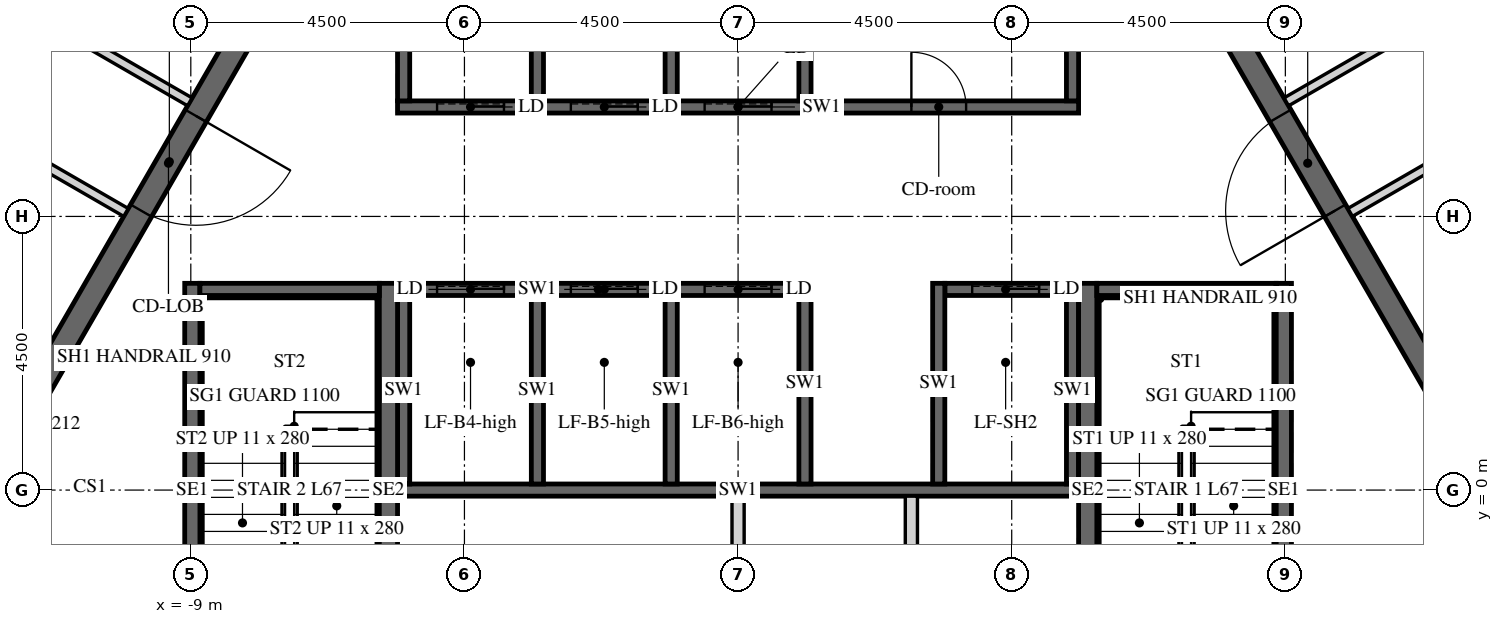
"""IFC4 building model, lengths in metres.
Left out: names, types, materials, properties, quantities, classifications, styles, units other than length and angle.
Written with IfcOpenShell. Run it as: python <this file> out.ifc"""

import sys

from ifc_helpers import new_model, si_unit, direction, frame, frame_2d, origin, place, context, subcontext, project, spatial, polyline, rectangle, outline, extrude, element, fill, save


model = new_model("IFC4")
c1 = context("Model", 3, precision=1e-05, world=origin(), true_north=direction((0.0, 1.0)))
c2 = subcontext(c1, "Body", "Model", "MODEL_VIEW")
j1 = project(units=[si_unit("LENGTHUNIT", "METRE"), si_unit("PLANEANGLEUNIT", "RADIAN")], contexts=[c1])
p1 = place(None, origin())
s1 = spatial("IfcSite", under=j1, at=p1, CompositionType="ELEMENT")
p2 = place(p1, origin())
s2 = spatial("IfcBuilding", under=s1, at=p2, CompositionType="ELEMENT")
p3 = place(p2, frame((0.0, 0.0, 279.6)))
s3 = spatial("IfcBuildingStorey", under=s2, at=p3, CompositionType="ELEMENT", Elevation=279.6)
p4 = place(p3, frame((-6.235, 10.8, -0.15), z_axis=(0.0, 0.0, 1.0), x_axis=(-0.499996419489, -0.866027470984, 0.0)))
e1 = element("IfcWall", 1, at=p4, inside=s3, PredefinedType="SHEAR", context=c2, shape_type="SweptSolid", body=[
    extrude(outline(polyline([(-0.115, -0.2), (12.586, -0.2), (12.355, 0.2), (0.115, 0.2), (-0.115, -0.2)])), origin(), (0.0, 0.0, 1.0), 3.9),
])
p5 = place(p4, frame((5.364, 0.0, 0.15)))
e2 = element("IfcOpeningElement", 2, at=p5, cuts=e1, PredefinedType="OPENING", context=c2, shape_type="SweptSolid", body=[
    extrude(rectangle(XDim=1.8, YDim=2.4, at=frame_2d((0.9, 1.2))), frame((0.0, 0.21, 0.0), z_axis=(0.0, -1.0, 0.0), x_axis=(1.0, 0.0, 0.0)), (0.0, 0.0, 1.0), 0.42),
])
p6 = place(p3, frame((-12.471, 0.0, -0.15), z_axis=(0.0, 0.0, 1.0), x_axis=(0.499996419489, -0.866027470984, 0.0)))
e3 = element("IfcWall", 3, at=p6, inside=s3, PredefinedType="SHEAR", context=c2, shape_type="SweptSolid", body=[
    extrude(outline(polyline([(-0.115, -0.2), (12.586, -0.2), (12.355, 0.2), (0.115, 0.2), (-0.115, -0.2)])), origin(), (0.0, 0.0, 1.0), 3.9),
])
p7 = place(p6, frame((5.306, 0.0, 0.15)))
e4 = element("IfcOpeningElement", 4, at=p7, cuts=e3, PredefinedType="OPENING", context=c2, shape_type="SweptSolid", body=[
    extrude(rectangle(XDim=1.8, YDim=2.4, at=frame_2d((0.9, 1.2))), frame((0.0, 0.21, 0.0), z_axis=(0.0, -1.0, 0.0), x_axis=(1.0, 0.0, 0.0)), (0.0, 0.0, 1.0), 0.42),
])
p8 = place(p3, frame((6.235, -10.8, -0.15), z_axis=(0.0, 0.0, 1.0), x_axis=(0.499996419489, 0.866027470984, 0.0)))
e5 = element("IfcWall", 5, at=p8, inside=s3, PredefinedType="SHEAR", context=c2, shape_type="SweptSolid", body=[
    extrude(outline(polyline([(-0.115, -0.2), (12.586, -0.2), (12.355, 0.2), (0.115, 0.2), (-0.115, -0.2)])), origin(), (0.0, 0.0, 1.0), 3.9),
])
p9 = place(p8, frame((5.364, 0.0, 0.15)))
e6 = element("IfcOpeningElement", 6, at=p9, cuts=e5, PredefinedType="OPENING", context=c2, shape_type="SweptSolid", body=[
    extrude(rectangle(XDim=1.8, YDim=2.4, at=frame_2d((0.9, 1.2))), frame((0.0, 0.21, 0.0), z_axis=(0.0, -1.0, 0.0), x_axis=(1.0, 0.0, 0.0)), (0.0, 0.0, 1.0), 0.42),
])
p10 = place(p3, frame((12.471, 0.0, -0.15), z_axis=(0.0, 0.0, 1.0), x_axis=(-0.499996419489, 0.866027470984, 0.0)))
e7 = element("IfcWall", 7, at=p10, inside=s3, PredefinedType="SHEAR", context=c2, shape_type="SweptSolid", body=[
    extrude(outline(polyline([(-0.115, -0.2), (12.586, -0.2), (12.355, 0.2), (0.115, 0.2), (-0.115, -0.2)])), origin(), (0.0, 0.0, 1.0), 3.9),
])
p11 = place(p10, frame((5.306, 0.0, 0.15)))
e8 = element("IfcOpeningElement", 8, at=p11, cuts=e7, PredefinedType="OPENING", context=c2, shape_type="SweptSolid", body=[
    extrude(rectangle(XDim=1.8, YDim=2.4, at=frame_2d((0.9, 1.2))), frame((0.0, 0.21, 0.0), z_axis=(0.0, -1.0, 0.0), x_axis=(1.0, 0.0, 0.0)), (0.0, 0.0, 1.0), 0.42),
])
p12 = place(p3, frame((-5.6, 6.3, -0.25), z_axis=(0.0, 0.0, 1.0), x_axis=(1.0, 0.0, 0.0)))
e9 = element("IfcWall", 9, at=p12, inside=s3, PredefinedType="SHEAR", context=c2, shape_type="SweptSolid", body=[
    extrude(rectangle(XDim=11.2, YDim=0.2, at=frame_2d((5.6, 0.0))), origin(), (0.0, 0.0, 1.0), 3.9),
])
p13 = place(p12, frame((8.45, 0.0, 0.25)))
e10 = element("IfcOpeningElement", 10, at=p13, cuts=e9, PredefinedType="OPENING", context=c2, shape_type="SweptSolid", body=[
    extrude(rectangle(XDim=0.9, YDim=2.1, at=frame_2d((0.45, 1.05))), frame((0.0, 0.11, 0.0), z_axis=(0.0, -1.0, 0.0), x_axis=(1.0, 0.0, 0.0)), (0.0, 0.0, 1.0), 0.22),
])
p14 = place(p12, frame((0.65, 0.0, 0.25)))
e11 = element("IfcOpeningElement", 11, at=p14, cuts=e9, PredefinedType="OPENING", context=c2, shape_type="SweptSolid", body=[
    extrude(rectangle(XDim=1.1, YDim=2.1, at=frame_2d((0.55, 1.05))), frame((0.0, 0.11, 0.0), z_axis=(0.0, -1.0, 0.0), x_axis=(1.0, 0.0, 0.0)), (0.0, 0.0, 1.0), 0.22),
])
p15 = place(p12, frame((2.85, 0.0, 0.25)))
e12 = element("IfcOpeningElement", 12, at=p15, cuts=e9, PredefinedType="OPENING", context=c2, shape_type="SweptSolid", body=[
    extrude(rectangle(XDim=1.1, YDim=2.1, at=frame_2d((0.55, 1.05))), frame((0.0, 0.11, 0.0), z_axis=(0.0, -1.0, 0.0), x_axis=(1.0, 0.0, 0.0)), (0.0, 0.0, 1.0), 0.22),
])
p16 = place(p12, frame((5.05, 0.0, 0.25)))
e13 = element("IfcOpeningElement", 13, at=p16, cuts=e9, PredefinedType="OPENING", context=c2, shape_type="SweptSolid", body=[
    extrude(rectangle(XDim=1.1, YDim=2.1, at=frame_2d((0.55, 1.05))), frame((0.0, 0.11, 0.0), z_axis=(0.0, -1.0, 0.0), x_axis=(1.0, 0.0, 0.0)), (0.0, 0.0, 1.0), 0.22),
])
for number, where, z_axis, x_axis in (
    (14, (-5.5, 6.4, -0.25), (0.0, 0.0, 1.0), (0.0, 1.0, 0.0)),
    (15, (-3.3, 6.4, -0.25), (0.0, 0.0, 1.0), (0.0, 1.0, 0.0)),
    (16, (-1.1, 6.4, -0.25), (0.0, 0.0, 1.0), (0.0, 1.0, 0.0)),
    (17, (1.1, 6.4, -0.25), (0.0, 0.0, 1.0), (0.0, 1.0, 0.0)),
    (18, (5.5, 6.4, -0.25), (0.0, 0.0, 1.0), (0.0, 1.0, 0.0)),
):
    element("IfcWall", number, at=place(p3, frame(where, z_axis=z_axis, x_axis=x_axis)), inside=s3, PredefinedType="SHEAR", context=c2, shape_type="SweptSolid", body=[
        extrude(rectangle(XDim=2.9, YDim=0.2, at=frame_2d((1.45, 0.0))), origin(), (0.0, 0.0, 1.0), 3.9),
    ])
p17 = place(p3, frame((-5.6, 3.3, -0.25), z_axis=(0.0, 0.0, 1.0), x_axis=(1.0, 0.0, 0.0)))
e19 = element("IfcWall", 19, at=p17, inside=s3, PredefinedType="SHEAR", context=c2, shape_type="SweptSolid", body=[
    extrude(rectangle(XDim=6.6, YDim=0.2, at=frame_2d((3.3, 0.0))), origin(), (0.0, 0.0, 1.0), 3.9),
])
p18 = place(p17, frame((0.65, 0.0, 0.25)))
e20 = element("IfcOpeningElement", 20, at=p18, cuts=e19, PredefinedType="OPENING", context=c2, shape_type="SweptSolid", body=[
    extrude(rectangle(XDim=1.1, YDim=2.1, at=frame_2d((0.55, 1.05))), frame((0.0, 0.11, 0.0), z_axis=(0.0, -1.0, 0.0), x_axis=(1.0, 0.0, 0.0)), (0.0, 0.0, 1.0), 0.22),
])
p19 = place(p17, frame((2.85, 0.0, 0.25)))
e21 = element("IfcOpeningElement", 21, at=p19, cuts=e19, PredefinedType="OPENING", context=c2, shape_type="SweptSolid", body=[
    extrude(rectangle(XDim=1.1, YDim=2.1, at=frame_2d((0.55, 1.05))), frame((0.0, 0.11, 0.0), z_axis=(0.0, -1.0, 0.0), x_axis=(1.0, 0.0, 0.0)), (0.0, 0.0, 1.0), 0.22),
])
p20 = place(p17, frame((5.05, 0.0, 0.25)))
e22 = element("IfcOpeningElement", 22, at=p20, cuts=e19, PredefinedType="OPENING", context=c2, shape_type="SweptSolid", body=[
    extrude(rectangle(XDim=1.1, YDim=2.1, at=frame_2d((0.55, 1.05))), frame((0.0, 0.11, 0.0), z_axis=(0.0, -1.0, 0.0), x_axis=(1.0, 0.0, 0.0)), (0.0, 0.0, 1.0), 0.22),
])
p21 = place(p3, frame((3.4, 3.3, -0.25), z_axis=(0.0, 0.0, 1.0), x_axis=(1.0, 0.0, 0.0)))
e23 = element("IfcWall", 23, at=p21, inside=s3, PredefinedType="SHEAR", context=c2, shape_type="SweptSolid", body=[
    extrude(rectangle(XDim=2.2, YDim=0.2, at=frame_2d((1.1, 0.0))), origin(), (0.0, 0.0, 1.0), 3.9),
])
p22 = place(p21, frame((0.45, 0.0, 0.25)))
e24 = element("IfcOpeningElement", 24, at=p22, cuts=e23, PredefinedType="OPENING", context=c2, shape_type="SweptSolid", body=[
    extrude(rectangle(XDim=1.1, YDim=2.1, at=frame_2d((0.55, 1.05))), frame((0.0, 0.11, 0.0), z_axis=(0.0, -1.0, 0.0), x_axis=(1.0, 0.0, 0.0)), (0.0, 0.0, 1.0), 0.22),
])
p23 = place(p3, frame((-5.6, 0.0, -0.25), z_axis=(0.0, 0.0, 1.0), x_axis=(1.0, 0.0, 0.0)))
e25 = element("IfcWall", 25, at=p23, inside=s3, PredefinedType="SHEAR", context=c2, shape_type="SweptSolid", body=[
    extrude(rectangle(XDim=11.2, YDim=0.2, at=frame_2d((5.6, 0.0))), origin(), (0.0, 0.0, 1.0), 3.9),
])
for number, where, z_axis, x_axis in (
    (26, (-5.5, 0.1, -0.25), (0.0, 0.0, 1.0), (0.0, 1.0, 0.0)),
    (27, (-3.3, 0.1, -0.25), (0.0, 0.0, 1.0), (0.0, 1.0, 0.0)),
    (28, (-1.1, 0.1, -0.25), (0.0, 0.0, 1.0), (0.0, 1.0, 0.0)),
):
    element("IfcWall", number, at=place(p3, frame(where, z_axis=z_axis, x_axis=x_axis)), inside=s3, PredefinedType="SHEAR", context=c2, shape_type="SweptSolid", body=[
        extrude(rectangle(XDim=3.1, YDim=0.2, at=frame_2d((1.55, 0.0))), origin(), (0.0, 0.0, 1.0), 3.9),
    ])
for number, where, z_axis, x_axis in (
    (29, (1.1, 0.1, -0.25), (0.0, 0.0, 1.0), (0.0, 1.0, 0.0)),
    (30, (3.3, 0.1, -0.25), (0.0, 0.0, 1.0), (0.0, 1.0, 0.0)),
):
    element("IfcWall", number, at=place(p3, frame(where, z_axis=z_axis, x_axis=x_axis)), inside=s3, PredefinedType="SHEAR", context=c2, shape_type="SweptSolid", body=[
        extrude(rectangle(XDim=3.3, YDim=0.2, at=frame_2d((1.65, 0.0))), origin(), (0.0, 0.0, 1.0), 3.9),
    ])
p24 = place(p3, frame((5.5, 0.1, -0.25), z_axis=(0.0, 0.0, 1.0), x_axis=(0.0, 1.0, 0.0)))
e31 = element("IfcWall", 31, at=p24, inside=s3, PredefinedType="SHEAR", context=c2, shape_type="SweptSolid", body=[
    extrude(rectangle(XDim=3.1, YDim=0.2, at=frame_2d((1.55, 0.0))), origin(), (0.0, 0.0, 1.0), 3.9),
])
p25 = place(p3, frame((2.85, -3.2, 0.0), z_axis=(0.0, 0.0, 1.0), x_axis=(0.0, 1.0, 0.0)))
e32 = element("IfcWall", 32, at=p25, inside=s3, PredefinedType="PARTITIONING", context=c2, shape_type="SweptSolid", body=[
    extrude(rectangle(XDim=3.1, YDim=0.2, at=frame_2d((1.55, 0.0))), origin(), (0.0, 0.0, 1.0), 3.65),
])
p26 = place(p3, frame((0.0, -6.2, 0.0), z_axis=(0.0, 0.0, 1.0), x_axis=(0.0, 1.0, 0.0)))
e33 = element("IfcWall", 33, at=p26, inside=s3, PredefinedType="PARTITIONING", context=c2, shape_type="SweptSolid", body=[
    extrude(rectangle(XDim=6.1, YDim=0.2, at=frame_2d((3.05, 0.0))), origin(), (0.0, 0.0, 1.0), 3.65),
])
p27 = place(p3, frame((5.75, -3.4, -0.25), z_axis=(0.0, 0.0, 1.0), x_axis=(0.0, 1.0, 0.0)))
e34 = element("IfcWall", 34, at=p27, inside=s3, PredefinedType="SHEAR", context=c2, shape_type="SweptSolid", body=[
    extrude(rectangle(XDim=6.8, YDim=0.3, at=frame_2d((3.4, 0.0))), origin(), (0.0, 0.0, 1.0), 3.9),
])
p28 = place(p3, frame((8.975, -3.4, -0.25), z_axis=(0.0, 0.0, 1.0), x_axis=(0.0, 1.0, 0.0)))
e35 = element("IfcWall", 35, at=p28, inside=s3, PredefinedType="SHEAR", context=c2, shape_type="SweptSolid", body=[
    extrude(rectangle(XDim=6.8, YDim=0.25, at=frame_2d((3.4, 0.0))), origin(), (0.0, 0.0, 1.0), 3.9),
])
p29 = place(p3, frame((5.9, 3.3, -0.25), z_axis=(0.0, 0.0, 1.0), x_axis=(1.0, 0.0, 0.0)))
e36 = element("IfcWall", 36, at=p29, inside=s3, PredefinedType="SHEAR", context=c2, shape_type="SweptSolid", body=[
    extrude(rectangle(XDim=2.95, YDim=0.2, at=frame_2d((1.475, 0.0))), origin(), (0.0, 0.0, 1.0), 3.9),
])
p30 = place(p3, frame((-5.75, -3.4, -0.25), z_axis=(0.0, 0.0, 1.0), x_axis=(0.0, 1.0, 0.0)))
e37 = element("IfcWall", 37, at=p30, inside=s3, PredefinedType="SHEAR", context=c2, shape_type="SweptSolid", body=[
    extrude(rectangle(XDim=6.8, YDim=0.3, at=frame_2d((3.4, 0.0))), origin(), (0.0, 0.0, 1.0), 3.9),
])
p31 = place(p3, frame((-8.975, -3.4, -0.25), z_axis=(0.0, 0.0, 1.0), x_axis=(0.0, 1.0, 0.0)))
e38 = element("IfcWall", 38, at=p31, inside=s3, PredefinedType="SHEAR", context=c2, shape_type="SweptSolid", body=[
    extrude(rectangle(XDim=6.8, YDim=0.25, at=frame_2d((3.4, 0.0))), origin(), (0.0, 0.0, 1.0), 3.9),
])
p32 = place(p3, frame((-8.85, 3.3, -0.25), z_axis=(0.0, 0.0, 1.0), x_axis=(1.0, 0.0, 0.0)))
e39 = element("IfcWall", 39, at=p32, inside=s3, PredefinedType="SHEAR", context=c2, shape_type="SweptSolid", body=[
    extrude(rectangle(XDim=2.95, YDim=0.2, at=frame_2d((1.475, 0.0))), origin(), (0.0, 0.0, 1.0), 3.9),
])
p33 = place(p3, frame((-8.622, 17.225, 0.0), z_axis=(0.0, 0.0, 1.0), x_axis=(-0.438366544921, -0.898796290765, 0.0)))
e40 = element("IfcWall", 40, at=p33, inside=s3, PredefinedType="PARTITIONING", context=c2, shape_type="SweptSolid", body=[
    extrude(rectangle(XDim=17.273, YDim=0.15, at=frame_2d((8.637, 0.0))), origin(), (0.0, 0.0, 1.0), 2.988),
])
p34 = place(p33, frame((10.078, 0.0, 0.0)))
e41 = element("IfcOpeningElement", 41, at=p34, cuts=e40, PredefinedType="OPENING", context=c2, shape_type="SweptSolid", body=[
    extrude(rectangle(XDim=1.0, YDim=2.1, at=frame_2d((0.5, 1.05))), frame((0.0, 0.085, 0.0), z_axis=(0.0, -1.0, 0.0), x_axis=(1.0, 0.0, 0.0)), (0.0, 0.0, 1.0), 0.17),
])
p35 = place(p3, frame((-9.016, 6.384, 0.0), z_axis=(0.0, 0.0, 1.0), x_axis=(-0.866010648346, 0.500025556299, 0.0)))
e42 = element("IfcWall", 42, at=p35, inside=s3, PredefinedType="PARTITIONING", context=c2, shape_type="SweptSolid", body=[
    extrude(rectangle(XDim=2.905, YDim=0.15, at=frame_2d((1.453, 0.0))), origin(), (0.0, 0.0, 1.0), 2.988),
])
p36 = place(p3, frame((-12.389, 5.907, 0.0), z_axis=(0.0, 0.0, 1.0), x_axis=(0.866034066097, -0.499984996134, 0.0)))
e43 = element("IfcWall", 43, at=p36, inside=s3, PredefinedType="PARTITIONING", context=c2, shape_type="SweptSolid", body=[
    extrude(rectangle(XDim=2.683, YDim=0.15, at=frame_2d((1.342, 0.0))), origin(), (0.0, 0.0, 1.0), 2.988),
])
p37 = place(p3, frame((19.228, -1.146, 0.0), z_axis=(0.0, 0.0, 1.0), x_axis=(-0.559173750718, 0.829050490928, 0.0)))
e44 = element("IfcWall", 44, at=p37, inside=s3, PredefinedType="PARTITIONING", context=c2, shape_type="SweptSolid", body=[
    extrude(rectangle(XDim=17.273, YDim=0.15, at=frame_2d((8.637, 0.0))), origin(), (0.0, 0.0, 1.0), 2.988),
])
p38 = place(p37, frame((9.478, 0.0, 0.0)))
e45 = element("IfcOpeningElement", 45, at=p38, cuts=e44, PredefinedType="OPENING", context=c2, shape_type="SweptSolid", body=[
    extrude(rectangle(XDim=1.0, YDim=2.1, at=frame_2d((0.5, 1.05))), frame((0.0, 0.085, 0.0), z_axis=(0.0, -1.0, 0.0), x_axis=(1.0, 0.0, 0.0)), (0.0, 0.0, 1.0), 0.17),
])
p39 = place(p3, frame((10.066, 4.566, 0.0), z_axis=(0.0, 0.0, 1.0), x_axis=(0.866034661658, 0.49998396455, 0.0)))
e46 = element("IfcWall", 46, at=p39, inside=s3, PredefinedType="PARTITIONING", context=c2, shape_type="SweptSolid", body=[
    extrude(rectangle(XDim=2.909, YDim=0.15, at=frame_2d((1.455, 0.0))), origin(), (0.0, 0.0, 1.0), 2.988),
])
p40 = place(p3, frame((11.343, 7.728, 0.0), z_axis=(0.0, 0.0, 1.0), x_axis=(-0.866037314867, -0.499979368833, 0.0)))
e47 = element("IfcWall", 47, at=p40, inside=s3, PredefinedType="PARTITIONING", context=c2, shape_type="SweptSolid", body=[
    extrude(rectangle(XDim=2.687, YDim=0.15, at=frame_2d((1.344, 0.0))), origin(), (0.0, 0.0, 1.0), 2.988),
])
p41 = place(p5, origin())
e48 = element("IfcDoor", 48, at=p41, inside=s3, OperationType="DOUBLE_DOOR_SINGLE_SWING", PredefinedType="DOOR", context=c2, shape_type="SweptSolid", body=[
    extrude(rectangle(XDim=1.8, YDim=2.4, at=frame_2d((0.9, 1.2))), frame((0.0, 0.025, 0.0), z_axis=(0.0, -1.0, 0.0), x_axis=(1.0, 0.0, 0.0)), (0.0, 0.0, 1.0), 0.05),
])
fill(e2, e48)
p42 = place(p11, origin())
e49 = element("IfcDoor", 49, at=p42, inside=s3, OperationType="DOUBLE_DOOR_SINGLE_SWING", PredefinedType="DOOR", context=c2, shape_type="SweptSolid", body=[
    extrude(rectangle(XDim=1.8, YDim=2.4, at=frame_2d((0.9, 1.2))), frame((0.0, 0.025, 0.0), z_axis=(0.0, -1.0, 0.0), x_axis=(1.0, 0.0, 0.0)), (0.0, 0.0, 1.0), 0.05),
])
fill(e8, e49)
p43 = place(p13, origin())
e50 = element("IfcDoor", 50, at=p43, inside=s3, OperationType="SINGLE_SWING_LEFT", PredefinedType="DOOR", context=c2, shape_type="SweptSolid", body=[
    extrude(rectangle(XDim=0.9, YDim=2.1, at=frame_2d((0.45, 1.05))), frame((0.0, 0.025, 0.0), z_axis=(0.0, -1.0, 0.0), x_axis=(1.0, 0.0, 0.0)), (0.0, 0.0, 1.0), 0.05),
])
fill(e10, e50)
p44 = place(p14, origin())
e51 = element("IfcDoor", 51, at=p44, inside=s3, OperationType="SLIDING_TO_LEFT", PredefinedType="DOOR", context=c2, shape_type="SweptSolid", body=[
    extrude(rectangle(XDim=1.1, YDim=2.1, at=frame_2d((0.55, 1.05))), frame((0.0, 0.025, 0.0), z_axis=(0.0, -1.0, 0.0), x_axis=(1.0, 0.0, 0.0)), (0.0, 0.0, 1.0), 0.05),
])
fill(e11, e51)
p45 = place(p15, origin())
e52 = element("IfcDoor", 52, at=p45, inside=s3, OperationType="SLIDING_TO_LEFT", PredefinedType="DOOR", context=c2, shape_type="SweptSolid", body=[
    extrude(rectangle(XDim=1.1, YDim=2.1, at=frame_2d((0.55, 1.05))), frame((0.0, 0.025, 0.0), z_axis=(0.0, -1.0, 0.0), x_axis=(1.0, 0.0, 0.0)), (0.0, 0.0, 1.0), 0.05),
])
fill(e12, e52)
p46 = place(p16, origin())
e53 = element("IfcDoor", 53, at=p46, inside=s3, OperationType="SLIDING_TO_LEFT", PredefinedType="DOOR", context=c2, shape_type="SweptSolid", body=[
    extrude(rectangle(XDim=1.1, YDim=2.1, at=frame_2d((0.55, 1.05))), frame((0.0, 0.025, 0.0), z_axis=(0.0, -1.0, 0.0), x_axis=(1.0, 0.0, 0.0)), (0.0, 0.0, 1.0), 0.05),
])
fill(e13, e53)
p47 = place(p18, origin())
e54 = element("IfcDoor", 54, at=p47, inside=s3, OperationType="SLIDING_TO_LEFT", PredefinedType="DOOR", context=c2, shape_type="SweptSolid", body=[
    extrude(rectangle(XDim=1.1, YDim=2.1, at=frame_2d((0.55, 1.05))), frame((0.0, 0.025, 0.0), z_axis=(0.0, -1.0, 0.0), x_axis=(1.0, 0.0, 0.0)), (0.0, 0.0, 1.0), 0.05),
])
fill(e20, e54)
p48 = place(p19, origin())
e55 = element("IfcDoor", 55, at=p48, inside=s3, OperationType="SLIDING_TO_LEFT", PredefinedType="DOOR", context=c2, shape_type="SweptSolid", body=[
    extrude(rectangle(XDim=1.1, YDim=2.1, at=frame_2d((0.55, 1.05))), frame((0.0, 0.025, 0.0), z_axis=(0.0, -1.0, 0.0), x_axis=(1.0, 0.0, 0.0)), (0.0, 0.0, 1.0), 0.05),
])
fill(e21, e55)
p49 = place(p20, origin())
e56 = element("IfcDoor", 56, at=p49, inside=s3, OperationType="SLIDING_TO_LEFT", PredefinedType="DOOR", context=c2, shape_type="SweptSolid", body=[
    extrude(rectangle(XDim=1.1, YDim=2.1, at=frame_2d((0.55, 1.05))), frame((0.0, 0.025, 0.0), z_axis=(0.0, -1.0, 0.0), x_axis=(1.0, 0.0, 0.0)), (0.0, 0.0, 1.0), 0.05),
])
fill(e22, e56)
p50 = place(p22, origin())
e57 = element("IfcDoor", 57, at=p50, inside=s3, OperationType="SLIDING_TO_LEFT", PredefinedType="DOOR", context=c2, shape_type="SweptSolid", body=[
    extrude(rectangle(XDim=1.1, YDim=2.1, at=frame_2d((0.55, 1.05))), frame((0.0, 0.025, 0.0), z_axis=(0.0, -1.0, 0.0), x_axis=(1.0, 0.0, 0.0)), (0.0, 0.0, 1.0), 0.05),
])
fill(e24, e57)
save(model, sys.argv[1])
